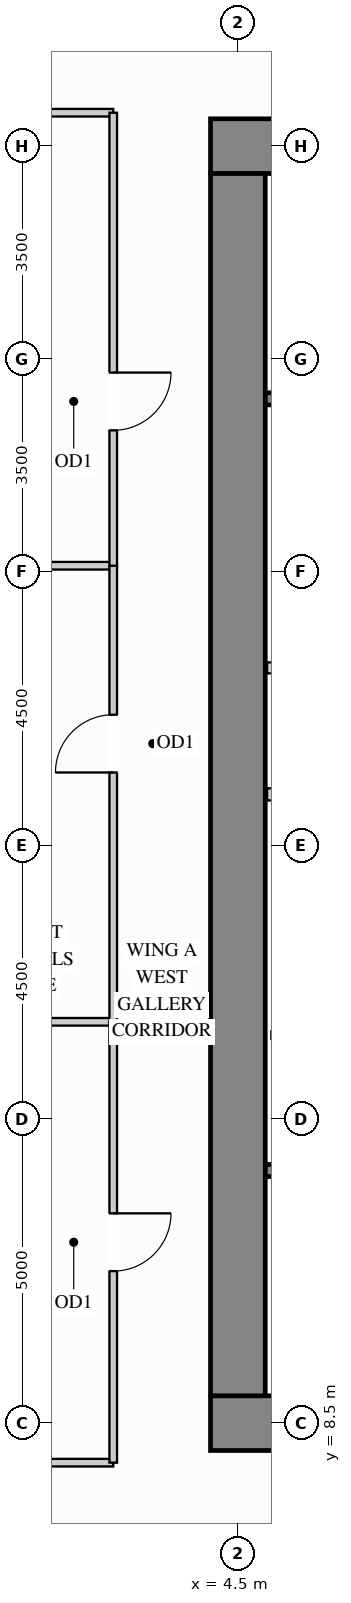
"""IFC4 building model, lengths in metres.
Left out: names, types, materials, properties, quantities, classifications, styles, units other than length and angle.
Written with IfcOpenShell. Run it as: python <this file> out.ifc"""

import sys

from ifc_helpers import new_model, si_unit, direction, frame, frame_2d, origin, place, context, subcontext, project, spatial, rectangle, extrude, source, transform, mapped, element, fill, save


model = new_model("IFC4")
c1 = context("Model", 3, precision=1e-05, world=origin(), true_north=direction((0.0, 1.0)))
c2 = subcontext(c1, "Body", "Model", "MODEL_VIEW")
j1 = project(units=[si_unit("LENGTHUNIT", "METRE"), si_unit("PLANEANGLEUNIT", "RADIAN")], contexts=[c1])
p1 = place(None, origin())
s1 = spatial("IfcSite", under=j1, at=p1, CompositionType="ELEMENT")
p2 = place(p1, origin())
s2 = spatial("IfcBuilding", under=s1, at=p2, CompositionType="ELEMENT")
p3 = place(p2, frame((0.0, 0.0, 26.1)))
s3 = spatial("IfcBuildingStorey", under=s2, at=p3, CompositionType="ELEMENT", Elevation=26.1)
m1 = source(origin(), c2, "Body", "SweptSolid", [
    extrude(rectangle(XDim=10.9, YDim=0.9, at=frame_2d((5.45, 0.0))), origin(), (0.0, 0.0, 1.0), 3.38),
])
for number, where, z_axis, x_axis in (
    (1, (4.05, 29.5, 0.0), (0.0, 0.0, 1.0), (1.0, 0.0, 0.0)),
    (2, (4.05, 8.5, 0.0), (0.0, 0.0, 1.0), (1.0, 0.0, 0.0)),
):
    element("IfcWall", number, at=place(p3, frame(where, z_axis=z_axis, x_axis=x_axis)), inside=s3, PredefinedType="SHEAR", context=c2, shape_type="MappedRepresentation", body=[
        mapped(m1, transform((0.0, 0.0, 0.0), x_axis=(1.0, 0.0, 0.0), y_axis=(0.0, 1.0, 0.0), z_axis=(0.0, 0.0, 1.0))),
    ])
m2 = source(origin(), c2, "Body", "SweptSolid", [
    extrude(rectangle(XDim=20.1, YDim=0.9, at=frame_2d((10.05, 0.0))), origin(), (0.0, 0.0, 1.0), 3.38),
])
p4 = place(p3, frame((4.5, 8.95, 0.0), z_axis=(0.0, 0.0, 1.0), x_axis=(0.0, 1.0, 0.0)))
e3 = element("IfcWall", 3, at=p4, inside=s3, PredefinedType="SHEAR", context=c2, shape_type="MappedRepresentation", body=[
    mapped(m2, transform((0.0, 0.0, 0.0), x_axis=(1.0, 0.0, 0.0), y_axis=(0.0, 1.0, 0.0), z_axis=(0.0, 0.0, 1.0))),
])
m3 = source(origin(), c2, "Body", "SweptSolid", [
    extrude(rectangle(XDim=2.17, YDim=0.18, at=frame_2d((1.085, 0.0))), origin(), (0.0, 0.0, 1.0), 3.365),
])
p5 = place(p3, frame((4.98, 20.92, 0.0), z_axis=(0.0, 0.0, 1.0), x_axis=(1.0, 0.0, 0.0)))
e4 = element("IfcWall", 4, at=p5, inside=s3, PredefinedType="PARTITIONING", context=c2, shape_type="MappedRepresentation", body=[
    mapped(m3, transform((0.0, 0.0, 0.0), x_axis=(1.0, 0.0, 0.0), y_axis=(0.0, 1.0, 0.0), z_axis=(0.0, 0.0, 1.0))),
])
p6 = place(p3, frame((5.05, 14.88, 0.0), z_axis=(0.0, 0.0, 1.0), x_axis=(1.0, 0.0, 0.0)))
e5 = element("IfcWall", 5, at=p6, inside=s3, PredefinedType="PARTITIONING", context=c2, shape_type="SweptSolid", body=[
    extrude(rectangle(XDim=2.35, YDim=0.125, at=frame_2d((1.175, 0.0))), origin(), (0.0, 0.0, 1.0), 3.365),
])
p7 = place(p6, frame((0.7, 0.0, 0.0)))
e6 = element("IfcOpeningElement", 6, at=p7, cuts=e5, PredefinedType="OPENING", context=c2, shape_type="SweptSolid", body=[
    extrude(rectangle(XDim=0.85, YDim=2.1, at=frame_2d((0.425, 1.05))), frame((0.0, 0.073, 0.0), z_axis=(0.0, -1.0, 0.0), x_axis=(1.0, 0.0, 0.0)), (0.0, 0.0, 1.0), 0.145),
])
m4 = source(origin(), c2, "Body", "SweptSolid", [
    extrude(rectangle(XDim=1.19, YDim=0.125, at=frame_2d((0.595, 0.0))), origin(), (0.0, 0.0, 1.0), 3.365),
])
for number, where, z_axis, x_axis in (
    (7, (1.26, 30.05, 0.0), (0.0, 0.0, 1.0), (1.0, 0.0, 0.0)),
    (8, (1.26, 7.85, 0.0), (0.0, 0.0, 1.0), (1.0, 0.0, 0.0)),
):
    element("IfcWall", number, at=place(p3, frame(where, z_axis=z_axis, x_axis=x_axis)), inside=s3, PredefinedType="PARTITIONING", context=c2, shape_type="MappedRepresentation", body=[
        mapped(m4, transform((0.0, 0.0, 0.0), x_axis=(1.0, 0.0, 0.0), y_axis=(0.0, 1.0, 0.0), z_axis=(0.0, 0.0, 1.0))),
    ])
m5 = source(origin(), c2, "Body", "SweptSolid", [
    extrude(rectangle(XDim=2.098, YDim=0.125, at=frame_2d((1.049, 0.0))), origin(), (0.0, 0.0, 1.0), 3.365),
])
p8 = place(p3, frame((0.352, 15.1, 0.0), z_axis=(0.0, 0.0, 1.0), x_axis=(1.0, 0.0, 0.0)))
e9 = element("IfcWall", 9, at=p8, inside=s3, PredefinedType="PARTITIONING", context=c2, shape_type="MappedRepresentation", body=[
    mapped(m5, transform((0.0, 0.0, 0.0), x_axis=(1.0, 0.0, 0.0), y_axis=(0.0, 1.0, 0.0), z_axis=(0.0, 0.0, 1.0))),
])
p9 = place(p3, frame((1.26, 22.6, 0.0), z_axis=(0.0, 0.0, 1.0), x_axis=(1.0, 0.0, 0.0)))
e10 = element("IfcWall", 10, at=p9, inside=s3, PredefinedType="PARTITIONING", context=c2, shape_type="MappedRepresentation", body=[
    mapped(m4, transform((0.0, 0.0, 0.0), x_axis=(1.0, 0.0, 0.0), y_axis=(0.0, 1.0, 0.0), z_axis=(0.0, 0.0, 1.0))),
])
p10 = place(p3, frame((2.45, 7.85, 0.0), z_axis=(0.0, 0.0, 1.0), x_axis=(0.0, 1.0, 0.0)))
e11 = element("IfcWall", 11, at=p10, inside=s3, PredefinedType="PARTITIONING", context=c2, shape_type="SweptSolid", body=[
    extrude(rectangle(XDim=7.25, YDim=0.125, at=frame_2d((3.625, 0.0))), origin(), (0.0, 0.0, 1.0), 3.365),
])
p11 = place(p10, frame((3.15, 0.0, 0.0)))
e12 = element("IfcOpeningElement", 12, at=p11, cuts=e11, PredefinedType="OPENING", context=c2, shape_type="SweptSolid", body=[
    extrude(rectangle(XDim=0.95, YDim=2.15, at=frame_2d((0.475, 1.075))), frame((0.0, 0.073, 0.0), z_axis=(0.0, -1.0, 0.0), x_axis=(1.0, 0.0, 0.0)), (0.0, 0.0, 1.0), 0.145),
])
p12 = place(p3, frame((2.45, 15.1, 0.0), z_axis=(0.0, 0.0, 1.0), x_axis=(0.0, 1.0, 0.0)))
e13 = element("IfcWall", 13, at=p12, inside=s3, PredefinedType="PARTITIONING", context=c2, shape_type="SweptSolid", body=[
    extrude(rectangle(XDim=7.5, YDim=0.125, at=frame_2d((3.75, 0.0))), origin(), (0.0, 0.0, 1.0), 3.365),
])
p13 = place(p12, frame((4.1, 0.0, 0.0)))
e14 = element("IfcOpeningElement", 14, at=p13, cuts=e13, PredefinedType="OPENING", context=c2, shape_type="SweptSolid", body=[
    extrude(rectangle(XDim=0.95, YDim=2.15, at=frame_2d((0.475, 1.075))), frame((0.0, 0.073, 0.0), z_axis=(0.0, -1.0, 0.0), x_axis=(1.0, 0.0, 0.0)), (0.0, 0.0, 1.0), 0.145),
])
p14 = place(p3, frame((2.45, 22.6, 0.0), z_axis=(0.0, 0.0, 1.0), x_axis=(0.0, 1.0, 0.0)))
e15 = element("IfcWall", 15, at=p14, inside=s3, PredefinedType="PARTITIONING", context=c2, shape_type="SweptSolid", body=[
    extrude(rectangle(XDim=7.45, YDim=0.125, at=frame_2d((3.725, 0.0))), origin(), (0.0, 0.0, 1.0), 3.365),
])
p15 = place(p14, frame((2.227, 0.0, 0.0)))
e16 = element("IfcOpeningElement", 16, at=p15, cuts=e15, PredefinedType="OPENING", context=c2, shape_type="SweptSolid", body=[
    extrude(rectangle(XDim=0.95, YDim=2.15, at=frame_2d((0.475, 1.075))), frame((0.0, 0.073, 0.0), z_axis=(0.0, -1.0, 0.0), x_axis=(1.0, 0.0, 0.0)), (0.0, 0.0, 1.0), 0.145),
])
m6 = source(origin(), c2, "Body", "SweptSolid", [
    extrude(rectangle(XDim=2.09, YDim=0.2, at=frame_2d((1.045, 0.0))), origin(), (0.0, 0.0, 1.0), 3.365),
])
p16 = place(p3, frame((4.98, 18.84, 0.0), z_axis=(0.0, 0.0, 1.0), x_axis=(1.0, 0.0, 0.0)))
e17 = element("IfcWall", 17, at=p16, inside=s3, PredefinedType="PARTITIONING", context=c2, shape_type="MappedRepresentation", body=[
    mapped(m6, transform((0.0, 0.0, 0.0), x_axis=(1.0, 0.0, 0.0), y_axis=(0.0, 1.0, 0.0), z_axis=(0.0, 0.0, 1.0))),
])
p17 = place(p3, frame((4.952, 12.655, 0.0), z_axis=(0.0, 0.0, 1.0), x_axis=(1.0, 0.0, 0.0)))
e18 = element("IfcWall", 18, at=p17, inside=s3, PredefinedType="SHEAR", context=c2, shape_type="SweptSolid", body=[
    extrude(rectangle(XDim=7.453, YDim=0.2, at=frame_2d((3.727, 0.0))), origin(), (0.0, 0.0, 1.0), 3.38),
])
p18 = place(p17, frame((0.4, 0.0, 0.0)))
e19 = element("IfcOpeningElement", 19, at=p18, cuts=e18, PredefinedType="OPENING", context=c2, shape_type="SweptSolid", body=[
    extrude(rectangle(XDim=1.1, YDim=2.15, at=frame_2d((0.55, 1.075))), frame((0.0, 0.11, 0.0), z_axis=(0.0, -1.0, 0.0), x_axis=(1.0, 0.0, 0.0)), (0.0, 0.0, 1.0), 0.22),
])
p19 = place(p3, frame((4.952, 25.345, 0.0), z_axis=(0.0, 0.0, 1.0), x_axis=(1.0, 0.0, 0.0)))
e20 = element("IfcWall", 20, at=p19, inside=s3, PredefinedType="SHEAR", context=c2, shape_type="SweptSolid", body=[
    extrude(rectangle(XDim=7.453, YDim=0.2, at=frame_2d((3.727, 0.0))), origin(), (0.0, 0.0, 1.0), 3.38),
])
p20 = place(p19, frame((0.4, 0.0, 0.0)))
e21 = element("IfcOpeningElement", 21, at=p20, cuts=e20, PredefinedType="OPENING", context=c2, shape_type="SweptSolid", body=[
    extrude(rectangle(XDim=1.1, YDim=2.15, at=frame_2d((0.55, 1.075))), frame((0.0, 0.11, 0.0), z_axis=(0.0, -1.0, 0.0), x_axis=(1.0, 0.0, 0.0)), (0.0, 0.0, 1.0), 0.22),
])
m7 = source(origin(), c2, "Body", "SweptSolid", [
    extrude(rectangle(XDim=0.95, YDim=2.15, at=frame_2d((0.475, 1.075))), frame((0.0, 0.025, 0.0), z_axis=(0.0, -1.0, 0.0), x_axis=(1.0, 0.0, 0.0)), (0.0, 0.0, 1.0), 0.05),
])
p21 = place(p11, origin())
e22 = element("IfcDoor", 22, at=p21, inside=s3, OperationType="SINGLE_SWING_RIGHT", PredefinedType="DOOR", context=c2, shape_type="MappedRepresentation", body=[
    mapped(m7, transform((0.0, 0.0, 0.0), x_axis=(1.0, 0.0, 0.0), y_axis=(0.0, 1.0, 0.0), z_axis=(0.0, 0.0, 1.0))),
])
fill(e12, e22)
p22 = place(p13, origin())
e23 = element("IfcDoor", 23, at=p22, inside=s3, OperationType="SINGLE_SWING_LEFT", PredefinedType="DOOR", context=c2, shape_type="MappedRepresentation", body=[
    mapped(m7, transform((0.0, 0.0, 0.0), x_axis=(1.0, 0.0, 0.0), y_axis=(0.0, 1.0, 0.0), z_axis=(0.0, 0.0, 1.0))),
])
fill(e14, e23)
p23 = place(p15, origin())
e24 = element("IfcDoor", 24, at=p23, inside=s3, OperationType="SINGLE_SWING_RIGHT", PredefinedType="DOOR", context=c2, shape_type="MappedRepresentation", body=[
    mapped(m7, transform((0.0, 0.0, 0.0), x_axis=(1.0, 0.0, 0.0), y_axis=(0.0, 1.0, 0.0), z_axis=(0.0, 0.0, 1.0))),
])
fill(e16, e24)
save(model, sys.argv[1])
